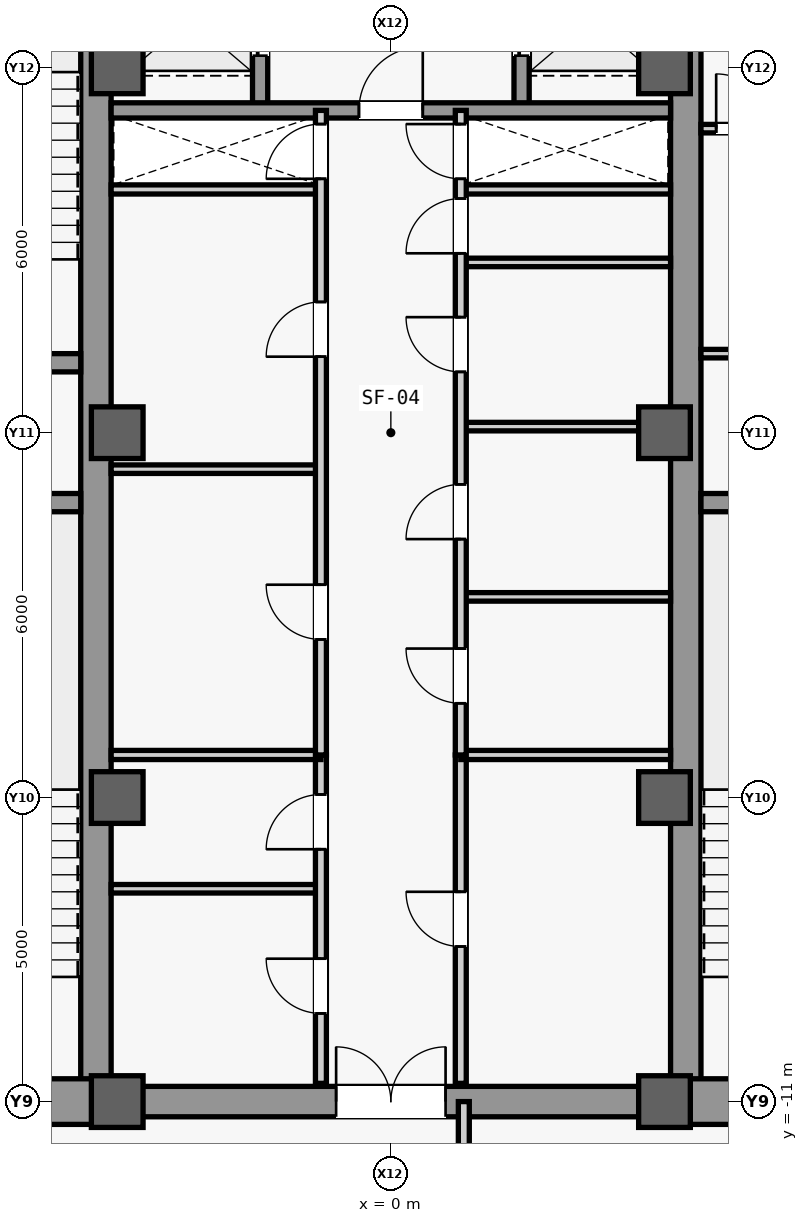
"""IFC4 building model, lengths in metres.
Left out: names, types, materials, properties, quantities, classifications, styles, units other than length and angle.
Written with IfcOpenShell. Run it as: python <this file> out.ifc"""

import sys

from ifc_helpers import new_model, si_unit, direction, frame, frame_2d, origin, origin_2d, place, context, subcontext, project, spatial, rectangle, extrude, source, transform, mapped, element, fill, save


model = new_model("IFC4")
c1 = context("Model", 3, precision=1e-05, world=origin(), true_north=direction((0.0, 1.0)))
c2 = subcontext(c1, "Body", "Model", "MODEL_VIEW")
j1 = project(units=[si_unit("LENGTHUNIT", "METRE"), si_unit("PLANEANGLEUNIT", "RADIAN")], contexts=[c1])
p1 = place(None, origin())
s1 = spatial("IfcSite", under=j1, at=p1, CompositionType="ELEMENT")
p2 = place(p1, origin())
s2 = spatial("IfcBuilding", under=s1, at=p2, CompositionType="ELEMENT")
p3 = place(p2, frame((0.0, 0.0, 159.1)))
s3 = spatial("IfcBuildingStorey", under=s2, at=p3, CompositionType="ELEMENT", Elevation=159.1)
m1 = source(origin(), c2, "Body", "SweptSolid", [
    extrude(rectangle(XDim=21.4, YDim=0.5, at=frame_2d((10.7, 0.0))), origin(), (0.0, 0.0, 1.0), 3.78),
])
for number, where, z_axis, x_axis in (
    (1, (-4.85, -10.7, 0.0), (0.0, 0.0, 1.0), (0.0, 1.0, 0.0)),
    (2, (4.85, -10.7, 0.0), (0.0, 0.0, 1.0), (0.0, 1.0, 0.0)),
):
    element("IfcWall", number, at=place(p3, frame(where, z_axis=z_axis, x_axis=x_axis)), inside=s3, PredefinedType="SHEAR", context=c2, shape_type="MappedRepresentation", body=[
        mapped(m1, transform((0.0, 0.0, 0.0), scale=1.0)),
    ])
m2 = source(origin(), c2, "Body", "SweptSolid", [
    extrude(rectangle(XDim=5.85, YDim=0.75, at=frame_2d((2.925, 0.0))), origin(), (0.0, 0.0, 1.0), 3.78),
])
for number, where, z_axis, x_axis in (
    (3, (-10.7, -11.0, 0.0), (0.0, 0.0, 1.0), (1.0, 0.0, 0.0)),
    (4, (4.85, -11.0, 0.0), (0.0, 0.0, 1.0), (1.0, 0.0, 0.0)),
):
    element("IfcWall", number, at=place(p3, frame(where, z_axis=z_axis, x_axis=x_axis)), inside=s3, PredefinedType="SHEAR", context=c2, shape_type="MappedRepresentation", body=[
        mapped(m2, transform((0.0, 0.0, 0.0), scale=1.0)),
    ])
m3 = source(origin(), c2, "Body", "SweptSolid", [
    extrude(rectangle(XDim=5.6, YDim=0.3, at=frame_2d((2.8, 0.0))), origin(), (0.0, 0.0, 1.0), 3.78),
])
for number, where, z_axis, x_axis in (
    (5, (-10.7, -1.15, 0.0), (0.0, 0.0, 1.0), (1.0, 0.0, 0.0)),
    (6, (-10.7, 1.15, 0.0), (0.0, 0.0, 1.0), (1.0, 0.0, 0.0)),
    (7, (5.1, -1.15, 0.0), (0.0, 0.0, 1.0), (1.0, 0.0, 0.0)),
):
    element("IfcWall", number, at=place(p3, frame(where, z_axis=z_axis, x_axis=x_axis)), inside=s3, PredefinedType="SHEAR", context=c2, shape_type="MappedRepresentation", body=[
        mapped(m3, transform((0.0, 0.0, 0.0), scale=1.0)),
    ])
m4 = source(origin(), c2, "Body", "SweptSolid", [
    extrude(rectangle(XDim=9.2, YDim=0.5, at=frame_2d((4.6, 0.0))), origin(), (0.0, 0.0, 1.0), 3.78),
])
p4 = place(p3, frame((-4.6, -11.0, 0.0), z_axis=(0.0, 0.0, 1.0), x_axis=(1.0, 0.0, 0.0)))
e8 = element("IfcWall", 8, at=p4, inside=s3, PredefinedType="SHEAR", context=c2, shape_type="MappedRepresentation", body=[
    mapped(m4, transform((0.0, 0.0, 0.0), scale=1.0)),
])
m5 = source(origin(), c2, "Body", "SweptSolid", [
    extrude(rectangle(XDim=1.8, YDim=2.25, at=frame_2d((0.9, 1.125))), frame((0.0, 0.26, 0.0), z_axis=(0.0, -1.0, 0.0), x_axis=(1.0, 0.0, 0.0)), (0.0, 0.0, 1.0), 0.52),
])
p5 = place(p4, frame((3.7, 0.0, 0.0)))
e9 = element("IfcOpeningElement", 9, at=p5, cuts=e8, PredefinedType="OPENING", context=c2, shape_type="MappedRepresentation", body=[
    mapped(m5, transform((0.0, 0.0, 0.0), scale=1.0)),
])
m6 = source(origin(), c2, "Body", "SweptSolid", [
    extrude(rectangle(XDim=0.85, YDim=0.85, at=origin_2d()), origin(), (0.0, 0.0, 1.0), 4.0),
])
for number, where, z_axis, x_axis in (
    (10, (-4.5, -11.0, 0.0), (0.0, 0.0, 1.0), (1.0, 0.0, 0.0)),
    (11, (-4.5, -6.0, 0.0), (0.0, 0.0, 1.0), (1.0, 0.0, 0.0)),
    (12, (-4.5, 0.0, 0.0), (0.0, 0.0, 1.0), (1.0, 0.0, 0.0)),
    (13, (-4.5, 6.0, 0.0), (0.0, 0.0, 1.0), (1.0, 0.0, 0.0)),
    (14, (4.5, -11.0, 0.0), (0.0, 0.0, 1.0), (1.0, 0.0, 0.0)),
    (15, (4.5, -6.0, 0.0), (0.0, 0.0, 1.0), (1.0, 0.0, 0.0)),
    (16, (4.5, 0.0, 0.0), (0.0, 0.0, 1.0), (1.0, 0.0, 0.0)),
    (17, (4.5, 6.0, 0.0), (0.0, 0.0, 1.0), (1.0, 0.0, 0.0)),
):
    element("IfcColumn", number, at=place(p3, frame(where, z_axis=z_axis, x_axis=x_axis)), inside=s3, PredefinedType="COLUMN", context=c2, shape_type="MappedRepresentation", body=[
        mapped(m6, transform((0.0, 0.0, 0.0), scale=1.0)),
    ])
m7 = source(origin(), c2, "Body", "SweptSolid", [
    extrude(rectangle(XDim=3.15, YDim=0.14, at=frame_2d((1.575, 0.0))), origin(), (0.0, 0.0, 1.0), 3.78),
])
p6 = place(p3, frame((5.1, 1.3, 0.0), z_axis=(0.0, 0.0, 1.0), x_axis=(1.0, 0.0, 0.0)))
e18 = element("IfcWall", 18, at=p6, inside=s3, PredefinedType="PARTITIONING", context=c2, shape_type="MappedRepresentation", body=[
    mapped(m7, transform((0.0, 0.0, 0.0), scale=1.0)),
])
p7 = place(p3, frame((5.1, 5.0, 0.0), z_axis=(0.0, 0.0, 1.0), x_axis=(1.0, 0.0, 0.0)))
e19 = element("IfcWall", 19, at=p7, inside=s3, PredefinedType="PARTITIONING", context=c2, shape_type="MappedRepresentation", body=[
    mapped(m7, transform((0.0, 0.0, 0.0), scale=1.0)),
])
m8 = source(origin(), c2, "Body", "SweptSolid", [
    extrude(rectangle(XDim=0.9, YDim=2.15, at=frame_2d((0.45, 1.075))), frame((0.0, 0.08, 0.0), z_axis=(0.0, -1.0, 0.0), x_axis=(1.0, 0.0, 0.0)), (0.0, 0.0, 1.0), 0.16),
])
p8 = place(p7, frame((0.25, 0.0, 0.0)))
e20 = element("IfcOpeningElement", 20, at=p8, cuts=e19, PredefinedType="OPENING", context=c2, shape_type="MappedRepresentation", body=[
    mapped(m8, transform((0.0, 0.0, 0.0), scale=1.0)),
])
m9 = source(origin(), c2, "Body", "SweptSolid", [
    extrude(rectangle(XDim=3.45, YDim=0.15, at=frame_2d((1.725, 0.0))), origin(), (0.0, 0.0, 1.0), 3.78),
])
for number, where, z_axis, x_axis in (
    (21, (-4.6, 4.0, 0.0), (0.0, 0.0, 1.0), (1.0, 0.0, 0.0)),
    (22, (1.15, 4.0, 0.0), (0.0, 0.0, 1.0), (1.0, 0.0, 0.0)),
):
    element("IfcWall", number, at=place(p3, frame(where, z_axis=z_axis, x_axis=x_axis)), inside=s3, PredefinedType="PARTITIONING", context=c2, shape_type="MappedRepresentation", body=[
        mapped(m9, transform((0.0, 0.0, 0.0), scale=1.0)),
    ])
m10 = source(origin(), c2, "Body", "SweptSolid", [
    extrude(rectangle(XDim=3.45, YDim=0.14, at=frame_2d((1.725, 0.0))), origin(), (0.0, 0.0, 1.0), 3.78),
])
p9 = place(p3, frame((-4.6, -7.5, 0.0), z_axis=(0.0, 0.0, 1.0), x_axis=(1.0, 0.0, 0.0)))
e23 = element("IfcWall", 23, at=p9, inside=s3, PredefinedType="PARTITIONING", context=c2, shape_type="MappedRepresentation", body=[
    mapped(m10, transform((0.0, 0.0, 0.0), scale=1.0)),
])
m11 = source(origin(), c2, "Body", "SweptSolid", [
    extrude(rectangle(XDim=5.4, YDim=0.18, at=frame_2d((2.7, 0.0))), origin(), (0.0, 0.0, 1.0), 3.78),
])
p10 = place(p3, frame((-1.15, -10.7, 0.0), z_axis=(0.0, 0.0, 1.0), x_axis=(0.0, 1.0, 0.0)))
e24 = element("IfcWall", 24, at=p10, inside=s3, PredefinedType="PARTITIONING", context=c2, shape_type="MappedRepresentation", body=[
    mapped(m11, transform((0.0, 0.0, 0.0), scale=1.0)),
])
m12 = source(origin(), c2, "Body", "SweptSolid", [
    extrude(rectangle(XDim=0.9, YDim=2.15, at=frame_2d((0.45, 1.075))), frame((0.0, 0.1, 0.0), z_axis=(0.0, -1.0, 0.0), x_axis=(1.0, 0.0, 0.0)), (0.0, 0.0, 1.0), 0.2),
])
p11 = place(p10, frame((1.15, 0.0, 0.0)))
e25 = element("IfcOpeningElement", 25, at=p11, cuts=e24, PredefinedType="OPENING", context=c2, shape_type="MappedRepresentation", body=[
    mapped(m12, transform((0.0, 0.0, 0.0), scale=1.0)),
])
p12 = place(p10, frame((3.85, 0.0, 0.0)))
e26 = element("IfcOpeningElement", 26, at=p12, cuts=e24, PredefinedType="OPENING", context=c2, shape_type="MappedRepresentation", body=[
    mapped(m12, transform((0.0, 0.0, 0.0), scale=1.0)),
])
p13 = place(p3, frame((1.15, -10.7, 0.0), z_axis=(0.0, 0.0, 1.0), x_axis=(0.0, 1.0, 0.0)))
e27 = element("IfcWall", 27, at=p13, inside=s3, PredefinedType="PARTITIONING", context=c2, shape_type="MappedRepresentation", body=[
    mapped(m11, transform((0.0, 0.0, 0.0), scale=1.0)),
])
p14 = place(p13, frame((2.25, 0.0, 0.0)))
e28 = element("IfcOpeningElement", 28, at=p14, cuts=e27, PredefinedType="OPENING", context=c2, shape_type="MappedRepresentation", body=[
    mapped(m12, transform((0.0, 0.0, 0.0), scale=1.0)),
])
for number, where, z_axis, x_axis in (
    (29, (-4.6, -5.3, 0.0), (0.0, 0.0, 1.0), (1.0, 0.0, 0.0)),
    (30, (1.15, -5.3, 0.0), (0.0, 0.0, 1.0), (1.0, 0.0, 0.0)),
):
    element("IfcWall", number, at=place(p3, frame(where, z_axis=z_axis, x_axis=x_axis)), inside=s3, PredefinedType="PARTITIONING", context=c2, shape_type="MappedRepresentation", body=[
        mapped(m9, transform((0.0, 0.0, 0.0), scale=1.0)),
    ])
m13 = source(origin(), c2, "Body", "SweptSolid", [
    extrude(rectangle(XDim=5.4, YDim=0.25, at=frame_2d((2.7, 0.0))), origin(), (0.0, 0.0, 1.0), 3.78),
])
p15 = place(p3, frame((-2.15, 5.3, 0.0), z_axis=(0.0, 0.0, 1.0), x_axis=(0.0, 1.0, 0.0)))
e31 = element("IfcWall", 31, at=p15, inside=s3, PredefinedType="SHEAR", context=c2, shape_type="MappedRepresentation", body=[
    mapped(m13, transform((0.0, 0.0, 0.0), scale=1.0)),
])
m14 = source(origin(), c2, "Body", "SweptSolid", [
    extrude(rectangle(XDim=1.2, YDim=2.3, at=frame_2d((0.6, 1.15))), frame((0.0, 0.135, 0.0), z_axis=(0.0, -1.0, 0.0), x_axis=(1.0, 0.0, 0.0)), (0.0, 0.0, 1.0), 0.27),
])
p16 = place(p15, frame((3.3, 0.0, 0.0)))
e32 = element("IfcOpeningElement", 32, at=p16, cuts=e31, PredefinedType="OPENING", context=c2, shape_type="MappedRepresentation", body=[
    mapped(m14, transform((0.0, 0.0, 0.0), scale=1.0)),
])
p17 = place(p15, frame((0.9, 0.0, 0.0)))
e33 = element("IfcOpeningElement", 33, at=p17, cuts=e31, PredefinedType="OPENING", context=c2, shape_type="MappedRepresentation", body=[
    mapped(m14, transform((0.0, 0.0, 0.0), scale=1.0)),
])
p18 = place(p3, frame((2.15, 5.3, 0.0), z_axis=(0.0, 0.0, 1.0), x_axis=(0.0, 1.0, 0.0)))
e34 = element("IfcWall", 34, at=p18, inside=s3, PredefinedType="SHEAR", context=c2, shape_type="MappedRepresentation", body=[
    mapped(m13, transform((0.0, 0.0, 0.0), scale=1.0)),
])
p19 = place(p18, frame((3.3, 0.0, 0.0)))
e35 = element("IfcOpeningElement", 35, at=p19, cuts=e34, PredefinedType="OPENING", context=c2, shape_type="MappedRepresentation", body=[
    mapped(m14, transform((0.0, 0.0, 0.0), scale=1.0)),
])
p20 = place(p18, frame((0.9, 0.0, 0.0)))
e36 = element("IfcOpeningElement", 36, at=p20, cuts=e34, PredefinedType="OPENING", context=c2, shape_type="MappedRepresentation", body=[
    mapped(m14, transform((0.0, 0.0, 0.0), scale=1.0)),
])
m15 = source(origin(), c2, "Body", "SweptSolid", [
    extrude(rectangle(XDim=9.2, YDim=0.25, at=frame_2d((4.6, 0.0))), origin(), (0.0, 0.0, 1.0), 3.78),
])
p21 = place(p3, frame((-4.6, 5.3, 0.0), z_axis=(0.0, 0.0, 1.0), x_axis=(1.0, 0.0, 0.0)))
e37 = element("IfcWall", 37, at=p21, inside=s3, PredefinedType="SHEAR", context=c2, shape_type="MappedRepresentation", body=[
    mapped(m15, transform((0.0, 0.0, 0.0), scale=1.0)),
])
m16 = source(origin(), c2, "Body", "SweptSolid", [
    extrude(rectangle(XDim=1.05, YDim=2.2, at=frame_2d((0.525, 1.1))), frame((0.0, 0.135, 0.0), z_axis=(0.0, -1.0, 0.0), x_axis=(1.0, 0.0, 0.0)), (0.0, 0.0, 1.0), 0.27),
])
p22 = place(p21, frame((4.075, 0.0, 0.0)))
e38 = element("IfcOpeningElement", 38, at=p22, cuts=e37, PredefinedType="OPENING", context=c2, shape_type="MappedRepresentation", body=[
    mapped(m16, transform((0.0, 0.0, 0.0), scale=1.0)),
])
p23 = place(p3, frame((-4.6, -0.6, 0.0), z_axis=(0.0, 0.0, 1.0), x_axis=(1.0, 0.0, 0.0)))
e39 = element("IfcWall", 39, at=p23, inside=s3, PredefinedType="PARTITIONING", context=c2, shape_type="MappedRepresentation", body=[
    mapped(m10, transform((0.0, 0.0, 0.0), scale=1.0)),
])
m17 = source(origin(), c2, "Body", "SweptSolid", [
    extrude(rectangle(XDim=10.6, YDim=0.18, at=frame_2d((5.3, 0.0))), origin(), (0.0, 0.0, 1.0), 3.78),
])
p24 = place(p3, frame((-1.15, -5.3, 0.0), z_axis=(0.0, 0.0, 1.0), x_axis=(0.0, 1.0, 0.0)))
e40 = element("IfcWall", 40, at=p24, inside=s3, PredefinedType="PARTITIONING", context=c2, shape_type="MappedRepresentation", body=[
    mapped(m17, transform((0.0, 0.0, 0.0), scale=1.0)),
])
p25 = place(p24, frame((1.9, 0.0, 0.0)))
e41 = element("IfcOpeningElement", 41, at=p25, cuts=e40, PredefinedType="OPENING", context=c2, shape_type="MappedRepresentation", body=[
    mapped(m12, transform((0.0, 0.0, 0.0), scale=1.0)),
])
p26 = place(p24, frame((6.55, 0.0, 0.0)))
e42 = element("IfcOpeningElement", 42, at=p26, cuts=e40, PredefinedType="OPENING", context=c2, shape_type="MappedRepresentation", body=[
    mapped(m12, transform((0.0, 0.0, 0.0), scale=1.0)),
])
p27 = place(p24, frame((9.475, 0.0, 0.0)))
e43 = element("IfcOpeningElement", 43, at=p27, cuts=e40, PredefinedType="OPENING", context=c2, shape_type="MappedRepresentation", body=[
    mapped(m12, transform((0.0, 0.0, 0.0), scale=1.0)),
])
p28 = place(p3, frame((1.15, -2.7, 0.0), z_axis=(0.0, 0.0, 1.0), x_axis=(1.0, 0.0, 0.0)))
e44 = element("IfcWall", 44, at=p28, inside=s3, PredefinedType="PARTITIONING", context=c2, shape_type="MappedRepresentation", body=[
    mapped(m10, transform((0.0, 0.0, 0.0), scale=1.0)),
])
m18 = source(origin(), c2, "Body", "SweptSolid", [
    extrude(rectangle(XDim=3.45, YDim=0.14, at=frame_2d((1.725, 0.0))), origin(), (0.0, 0.0, 1.0), 3.085),
])
p29 = place(p3, frame((1.15, 0.1, 0.0), z_axis=(0.0, 0.0, 1.0), x_axis=(1.0, 0.0, 0.0)))
e45 = element("IfcWall", 45, at=p29, inside=s3, PredefinedType="PARTITIONING", context=c2, shape_type="MappedRepresentation", body=[
    mapped(m18, transform((0.0, 0.0, 0.0), scale=1.0)),
])
p30 = place(p3, frame((1.15, 2.8, 0.0), z_axis=(0.0, 0.0, 1.0), x_axis=(1.0, 0.0, 0.0)))
e46 = element("IfcWall", 46, at=p30, inside=s3, PredefinedType="PARTITIONING", context=c2, shape_type="MappedRepresentation", body=[
    mapped(m10, transform((0.0, 0.0, 0.0), scale=1.0)),
])
p31 = place(p3, frame((1.15, -5.3, 0.0), z_axis=(0.0, 0.0, 1.0), x_axis=(0.0, 1.0, 0.0)))
e47 = element("IfcWall", 47, at=p31, inside=s3, PredefinedType="PARTITIONING", context=c2, shape_type="MappedRepresentation", body=[
    mapped(m17, transform((0.0, 0.0, 0.0), scale=1.0)),
])
p32 = place(p31, frame((0.85, 0.0, 0.0)))
e48 = element("IfcOpeningElement", 48, at=p32, cuts=e47, PredefinedType="OPENING", context=c2, shape_type="MappedRepresentation", body=[
    mapped(m12, transform((0.0, 0.0, 0.0), scale=1.0)),
])
p33 = place(p31, frame((3.55, 0.0, 0.0)))
e49 = element("IfcOpeningElement", 49, at=p33, cuts=e47, PredefinedType="OPENING", context=c2, shape_type="MappedRepresentation", body=[
    mapped(m12, transform((0.0, 0.0, 0.0), scale=1.0)),
])
p34 = place(p31, frame((6.3, 0.0, 0.0)))
e50 = element("IfcOpeningElement", 50, at=p34, cuts=e47, PredefinedType="OPENING", context=c2, shape_type="MappedRepresentation", body=[
    mapped(m12, transform((0.0, 0.0, 0.0), scale=1.0)),
])
p35 = place(p31, frame((8.25, 0.0, 0.0)))
e51 = element("IfcOpeningElement", 51, at=p35, cuts=e47, PredefinedType="OPENING", context=c2, shape_type="MappedRepresentation", body=[
    mapped(m12, transform((0.0, 0.0, 0.0), scale=1.0)),
])
p36 = place(p31, frame((9.475, 0.0, 0.0)))
e52 = element("IfcOpeningElement", 52, at=p36, cuts=e47, PredefinedType="OPENING", context=c2, shape_type="MappedRepresentation", body=[
    mapped(m12, transform((0.0, 0.0, 0.0), scale=1.0)),
])
m19 = source(origin(), c2, "Body", "SweptSolid", [
    extrude(rectangle(XDim=2.6, YDim=0.18, at=frame_2d((1.3, 0.0))), origin(), (0.0, 0.0, 1.0), 3.78),
])
p37 = place(p3, frame((1.2, -13.6, 0.0), z_axis=(0.0, 0.0, 1.0), x_axis=(0.0, 1.0, 0.0)))
e53 = element("IfcWall", 53, at=p37, inside=s3, PredefinedType="PARTITIONING", context=c2, shape_type="MappedRepresentation", body=[
    mapped(m19, transform((0.0, 0.0, 0.0), scale=1.0)),
])
m20 = source(origin(), c2, "Body", "SweptSolid", [
    extrude(rectangle(XDim=0.9, YDim=2.15, at=frame_2d((0.45, 1.075))), frame((0.0, 0.025, 0.0), z_axis=(0.0, -1.0, 0.0), x_axis=(1.0, 0.0, 0.0)), (0.0, 0.0, 1.0), 0.05),
])
p38 = place(p8, origin())
e54 = element("IfcDoor", 54, at=p38, inside=s3, OperationType="SINGLE_SWING_LEFT", PredefinedType="DOOR", context=c2, shape_type="MappedRepresentation", body=[
    mapped(m20, transform((0.0, 0.0, 0.0), scale=1.0)),
])
fill(e20, e54)
p39 = place(p11, origin())
e55 = element("IfcDoor", 55, at=p39, inside=s3, OperationType="SINGLE_SWING_RIGHT", PredefinedType="DOOR", context=c2, shape_type="MappedRepresentation", body=[
    mapped(m20, transform((0.0, 0.0, 0.0), scale=1.0)),
])
fill(e25, e55)
p40 = place(p12, origin())
e56 = element("IfcDoor", 56, at=p40, inside=s3, OperationType="SINGLE_SWING_LEFT", PredefinedType="DOOR", context=c2, shape_type="MappedRepresentation", body=[
    mapped(m20, transform((0.0, 0.0, 0.0), scale=1.0)),
])
fill(e26, e56)
p41 = place(p14, origin())
e57 = element("IfcDoor", 57, at=p41, inside=s3, OperationType="SINGLE_SWING_RIGHT", PredefinedType="DOOR", context=c2, shape_type="MappedRepresentation", body=[
    mapped(m20, transform((0.0, 0.0, 0.0), scale=1.0)),
])
fill(e28, e57)
m21 = source(origin(), c2, "Body", "SweptSolid", [
    extrude(rectangle(XDim=1.8, YDim=2.25, at=frame_2d((0.9, 1.125))), frame((0.0, 0.025, 0.0), z_axis=(0.0, -1.0, 0.0), x_axis=(1.0, 0.0, 0.0)), (0.0, 0.0, 1.0), 0.05),
])
p42 = place(p5, origin())
e58 = element("IfcDoor", 58, at=p42, inside=s3, OperationType="SINGLE_SWING_LEFT", PredefinedType="DOOR", context=c2, shape_type="MappedRepresentation", body=[
    mapped(m21, transform((0.0, 0.0, 0.0), scale=1.0)),
])
fill(e9, e58)
m22 = source(origin(), c2, "Body", "SweptSolid", [
    extrude(rectangle(XDim=1.05, YDim=2.2, at=frame_2d((0.525, 1.1))), frame((0.0, 0.025, 0.0), z_axis=(0.0, -1.0, 0.0), x_axis=(1.0, 0.0, 0.0)), (0.0, 0.0, 1.0), 0.05),
])
p43 = place(p22, origin())
e59 = element("IfcDoor", 59, at=p43, inside=s3, OperationType="SINGLE_SWING_RIGHT", PredefinedType="DOOR", context=c2, shape_type="MappedRepresentation", body=[
    mapped(m22, transform((0.0, 0.0, 0.0), scale=1.0)),
])
fill(e38, e59)
p44 = place(p25, origin())
e60 = element("IfcDoor", 60, at=p44, inside=s3, OperationType="SINGLE_SWING_RIGHT", PredefinedType="DOOR", context=c2, shape_type="MappedRepresentation", body=[
    mapped(m20, transform((0.0, 0.0, 0.0), scale=1.0)),
])
fill(e41, e60)
p45 = place(p26, origin())
e61 = element("IfcDoor", 61, at=p45, inside=s3, OperationType="SINGLE_SWING_LEFT", PredefinedType="DOOR", context=c2, shape_type="MappedRepresentation", body=[
    mapped(m20, transform((0.0, 0.0, 0.0), scale=1.0)),
])
fill(e42, e61)
p46 = place(p32, origin())
e62 = element("IfcDoor", 62, at=p46, inside=s3, OperationType="SINGLE_SWING_RIGHT", PredefinedType="DOOR", context=c2, shape_type="MappedRepresentation", body=[
    mapped(m20, transform((0.0, 0.0, 0.0), scale=1.0)),
])
fill(e48, e62)
p47 = place(p33, origin())
e63 = element("IfcDoor", 63, at=p47, inside=s3, OperationType="SINGLE_SWING_LEFT", PredefinedType="DOOR", context=c2, shape_type="MappedRepresentation", body=[
    mapped(m20, transform((0.0, 0.0, 0.0), scale=1.0)),
])
fill(e49, e63)
p48 = place(p34, origin())
e64 = element("IfcDoor", 64, at=p48, inside=s3, OperationType="SINGLE_SWING_RIGHT", PredefinedType="DOOR", context=c2, shape_type="MappedRepresentation", body=[
    mapped(m20, transform((0.0, 0.0, 0.0), scale=1.0)),
])
fill(e50, e64)
p49 = place(p35, origin())
e65 = element("IfcDoor", 65, at=p49, inside=s3, OperationType="SINGLE_SWING_LEFT", PredefinedType="DOOR", context=c2, shape_type="MappedRepresentation", body=[
    mapped(m20, transform((0.0, 0.0, 0.0), scale=1.0)),
])
fill(e51, e65)
p50 = place(p27, origin())
e66 = element("IfcDoor", 66, at=p50, inside=s3, OperationType="SINGLE_SWING_LEFT", PredefinedType="DOOR", context=c2, shape_type="MappedRepresentation", body=[
    mapped(m20, transform((0.0, 0.0, 0.0), scale=1.0)),
])
fill(e43, e66)
p51 = place(p36, origin())
e67 = element("IfcDoor", 67, at=p51, inside=s3, OperationType="SINGLE_SWING_RIGHT", PredefinedType="DOOR", context=c2, shape_type="MappedRepresentation", body=[
    mapped(m20, transform((0.0, 0.0, 0.0), scale=1.0)),
])
fill(e52, e67)
m23 = source(origin(), c2, "Body", "SweptSolid", [
    extrude(rectangle(XDim=1.2, YDim=2.3, at=frame_2d((0.6, 1.15))), frame((0.0, 0.025, 0.0), z_axis=(0.0, -1.0, 0.0), x_axis=(1.0, 0.0, 0.0)), (0.0, 0.0, 1.0), 0.05),
])
p52 = place(p17, origin())
e68 = element("IfcDoor", 68, at=p52, inside=s3, OperationType="SLIDING_TO_LEFT", PredefinedType="DOOR", context=c2, shape_type="MappedRepresentation", body=[
    mapped(m23, transform((0.0, 0.0, 0.0), scale=1.0)),
])
fill(e33, e68)
p53 = place(p20, origin())
e69 = element("IfcDoor", 69, at=p53, inside=s3, OperationType="SLIDING_TO_LEFT", PredefinedType="DOOR", context=c2, shape_type="MappedRepresentation", body=[
    mapped(m23, transform((0.0, 0.0, 0.0), scale=1.0)),
])
fill(e36, e69)
save(model, sys.argv[1])
